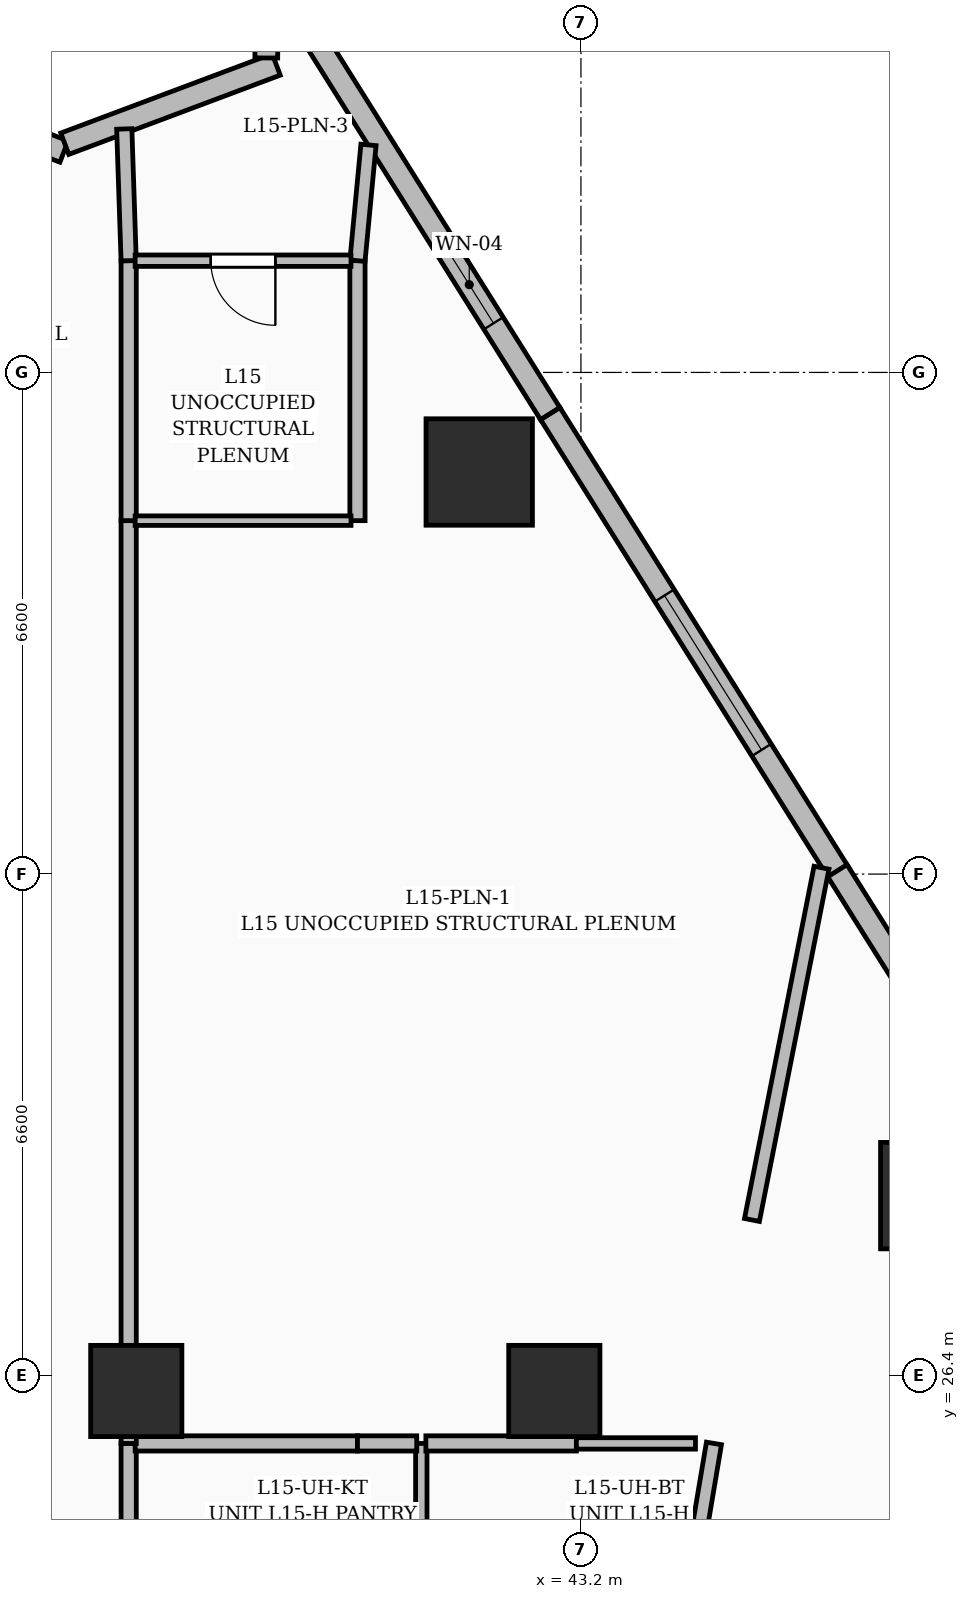
"""IFC4 building model, lengths in metres.
Left out: names, types, materials, properties, quantities, classifications, styles, units other than length and angle.
Written with IfcOpenShell. Run it as: python <this file> out.ifc"""

import sys

from ifc_helpers import new_model, si_unit, direction, frame, frame_2d, origin, origin_2d, place, context, subcontext, project, spatial, rectangle, extrude, element, fill, save


model = new_model("IFC4")
c1 = context("Model", 3, precision=1e-05, world=origin(), true_north=direction((0.0, 1.0)))
c2 = subcontext(c1, "Body", "Model", "MODEL_VIEW")
j1 = project(units=[si_unit("LENGTHUNIT", "METRE"), si_unit("PLANEANGLEUNIT", "RADIAN")], contexts=[c1])
p1 = place(None, origin())
s1 = spatial("IfcSite", under=j1, at=p1, CompositionType="ELEMENT")
p2 = place(p1, origin())
s2 = spatial("IfcBuilding", under=s1, at=p2, CompositionType="ELEMENT")
p3 = place(p2, frame((0.0, 0.0, 64.2)))
s3 = spatial("IfcBuildingStorey", under=s2, at=p3, CompositionType="ELEMENT", Elevation=64.2)
for number, where, z_axis, x_axis in (
    (1, (42.85, 26.2, 0.0), (0.0, 0.0, 1.0), (1.0, 0.0, 0.0)),
    (2, (37.35, 26.2, 0.0), (0.0, 0.0, 1.0), (1.0, 0.0, 0.0)),
):
    element("IfcColumn", number, at=place(p3, frame(where, z_axis=z_axis, x_axis=x_axis)), inside=s3, PredefinedType="COLUMN", context=c2, shape_type="SweptSolid", body=[
        extrude(rectangle(XDim=1.2, YDim=1.2, at=origin_2d()), origin(), (0.0, 0.0, 1.0), 3.6),
    ])
for number, where, z_axis, x_axis in (
    (3, (47.842, 28.77, 0.0), (0.0, 0.0, 1.0), (1.0, 0.0, 0.0)),
    (4, (41.862, 38.29, 0.0), (0.0, 0.0, 1.0), (1.0, 0.0, 0.0)),
):
    element("IfcColumn", number, at=place(p3, frame(where, z_axis=z_axis, x_axis=x_axis)), inside=s3, PredefinedType="COLUMN", context=c2, shape_type="SweptSolid", body=[
        extrude(rectangle(XDim=1.4, YDim=1.4, at=origin_2d()), origin(), (0.0, 0.0, 1.0), 3.6),
    ])
p4 = place(p3, frame((33.614, 43.579, 0.0), z_axis=(0.0, 0.0, 1.0), x_axis=(0.933166321884, -0.359444871576, 0.0)))
e5 = element("IfcWall", 5, at=p4, inside=s3, PredefinedType="SOLIDWALL", context=c2, shape_type="SweptSolid", body=[
    extrude(rectangle(XDim=2.985, YDim=0.3, at=frame_2d((1.493, 0.0))), origin(), (0.0, 0.0, 1.0), 3.35),
])
p5 = place(p4, frame((0.35, 0.0, 0.6)))
e6 = element("IfcOpeningElement", 6, at=p5, cuts=e5, PredefinedType="OPENING", context=c2, shape_type="SweptSolid", body=[
    extrude(rectangle(XDim=1.8, YDim=2.1, at=frame_2d((0.9, 1.05))), frame((0.0, 0.16, 0.0), z_axis=(0.0, -1.0, 0.0), x_axis=(1.0, 0.0, 0.0)), (0.0, 0.0, 1.0), 0.32),
])
p6 = place(p3, frame((36.409, 42.609, 0.0), z_axis=(0.0, 0.0, 1.0), x_axis=(0.936403459864, 0.350925291699, 0.0)))
e7 = element("IfcWall", 7, at=p6, inside=s3, PredefinedType="SOLIDWALL", context=c2, shape_type="SweptSolid", body=[
    extrude(rectangle(XDim=2.971, YDim=0.3, at=frame_2d((1.485, 0.0))), origin(), (0.0, 0.0, 1.0), 3.35),
])
p7 = place(p3, frame((39.061, 43.737, 0.0), z_axis=(0.0, 0.0, 1.0), x_axis=(0.004359916705, 0.999990495518, 0.0)))
e8 = element("IfcWall", 8, at=p7, inside=s3, PredefinedType="SOLIDWALL", context=c2, shape_type="SweptSolid", body=[
    extrude(rectangle(XDim=1.4, YDim=0.3, at=frame_2d((0.7, 0.0))), origin(), (0.0, 0.0, 1.0), 3.35),
])
p8 = place(p3, frame((39.284, 44.65, 0.0), z_axis=(0.0, 0.0, 1.0), x_axis=(0.531931524323, -0.846787372031, 0.0)))
e9 = element("IfcWall", 9, at=p8, inside=s3, PredefinedType="SOLIDWALL", context=c2, shape_type="SweptSolid", body=[
    extrude(rectangle(XDim=6.604, YDim=0.3, at=frame_2d((3.302, 0.0))), origin(), (0.0, 0.0, 1.0), 3.35),
])
p9 = place(p8, frame((4.0, 0.0, 0.8)))
e10 = element("IfcOpeningElement", 10, at=p9, cuts=e9, PredefinedType="OPENING", context=c2, shape_type="SweptSolid", body=[
    extrude(rectangle(XDim=1.2, YDim=1.8, at=frame_2d((0.6, 0.9))), frame((0.0, 0.16, 0.0), z_axis=(0.0, -1.0, 0.0), x_axis=(1.0, 0.0, 0.0)), (0.0, 0.0, 1.0), 0.32),
])
p10 = place(p3, frame((42.797, 39.058, 0.0), z_axis=(0.0, 0.0, 1.0), x_axis=(0.531893353762, -0.846811348663, 0.0)))
e11 = element("IfcWall", 11, at=p10, inside=s3, PredefinedType="SOLIDWALL", context=c2, shape_type="SweptSolid", body=[
    extrude(rectangle(XDim=7.154, YDim=0.3, at=frame_2d((3.577, 0.0))), origin(), (0.0, 0.0, 1.0), 3.35),
])
p11 = place(p10, frame((2.825, 0.0, 0.6)))
e12 = element("IfcOpeningElement", 12, at=p11, cuts=e11, PredefinedType="OPENING", context=c2, shape_type="SweptSolid", body=[
    extrude(rectangle(XDim=2.4, YDim=2.1, at=frame_2d((1.2, 1.05))), frame((0.0, 0.16, 0.0), z_axis=(0.0, -1.0, 0.0), x_axis=(1.0, 0.0, 0.0)), (0.0, 0.0, 1.0), 0.32),
])
p12 = place(p3, frame((46.574, 33.044, 0.0), z_axis=(0.0, 0.0, 1.0), x_axis=(0.531903730452, -0.846804830839, 0.0)))
e13 = element("IfcWall", 13, at=p12, inside=s3, PredefinedType="SOLIDWALL", context=c2, shape_type="SweptSolid", body=[
    extrude(rectangle(XDim=7.207, YDim=0.3, at=frame_2d((3.604, 0.0))), origin(), (0.0, 0.0, 1.0), 3.35),
])
p13 = place(p12, frame((1.903, 0.0, 0.55)))
e14 = element("IfcOpeningElement", 14, at=p13, cuts=e13, PredefinedType="OPENING", context=c2, shape_type="SweptSolid", body=[
    extrude(rectangle(XDim=2.1, YDim=2.4, at=frame_2d((1.05, 1.2))), frame((0.0, 0.16, 0.0), z_axis=(0.0, -1.0, 0.0), x_axis=(1.0, 0.0, 0.0)), (0.0, 0.0, 1.0), 0.32),
])
p14 = place(p3, frame((41.1, 22.768, 0.0), z_axis=(0.0, 0.0, 1.0), x_axis=(0.0, 1.0, 0.0)))
e15 = element("IfcWall", 15, at=p14, inside=s3, PredefinedType="PARTITIONING", context=c2, shape_type="SweptSolid", body=[
    extrude(rectangle(XDim=2.742, YDim=0.15, at=frame_2d((1.371, 0.0))), origin(), (0.0, 0.0, 1.0), 3.35),
])
p15 = place(p3, frame((37.25, 25.51, 0.0), z_axis=(0.0, 0.0, 1.0), x_axis=(0.0, -1.0, 0.0)))
e16 = element("IfcWall", 16, at=p15, inside=s3, PredefinedType="PARTITIONING", context=c2, shape_type="SweptSolid", body=[
    extrude(rectangle(XDim=2.742, YDim=0.2, at=frame_2d((1.371, 0.0))), origin(), (0.0, 0.0, 1.0), 2.309),
])
p16 = place(p3, frame((40.26, 25.51, 0.0), z_axis=(0.0, 0.0, 1.0), x_axis=(-1.0, 0.0, 0.0)))
e17 = element("IfcWall", 17, at=p16, inside=s3, PredefinedType="PARTITIONING", context=c2, shape_type="SweptSolid", body=[
    extrude(rectangle(XDim=2.925, YDim=0.2, at=frame_2d((1.462, 0.0))), origin(), (0.0, 0.0, 1.0), 3.35),
])
p17 = place(p3, frame((44.49, 22.779, 0.0), z_axis=(0.0, 0.0, 1.0), x_axis=(0.166100060311, 0.986108903704, 0.0)))
e18 = element("IfcWall", 18, at=p17, inside=s3, PredefinedType="PARTITIONING", context=c2, shape_type="SweptSolid", body=[
    extrude(rectangle(XDim=2.769, YDim=0.2, at=frame_2d((1.385, 0.0))), origin(), (0.0, 0.0, 1.0), 3.35),
])
p18 = place(p3, frame((43.14, 25.51, 0.0), z_axis=(0.0, 0.0, 1.0), x_axis=(-1.0, 0.0, 0.0)))
e19 = element("IfcWall", 19, at=p18, inside=s3, PredefinedType="PARTITIONING", context=c2, shape_type="SweptSolid", body=[
    extrude(rectangle(XDim=1.98, YDim=0.2, at=frame_2d((0.99, 0.0))), origin(), (0.0, 0.0, 1.0), 2.309),
])
p19 = place(p3, frame((46.365, 33.084, 0.0), z_axis=(0.0, 0.0, 1.0), x_axis=(-0.193720090738, -0.981056841597, 0.0)))
e20 = element("IfcWall", 20, at=p19, inside=s3, PredefinedType="PARTITIONING", context=c2, shape_type="SweptSolid", body=[
    extrude(rectangle(XDim=4.724, YDim=0.2, at=frame_2d((2.362, 0.0))), origin(), (0.0, 0.0, 1.0), 2.37),
])
p20 = place(p3, frame((37.25, 25.51, 0.0), z_axis=(0.0, 0.0, 1.0), x_axis=(0.0, 1.0, 0.0)))
e21 = element("IfcWall", 21, at=p20, inside=s3, PredefinedType="PARTITIONING", context=c2, shape_type="SweptSolid", body=[
    extrude(rectangle(XDim=12.14, YDim=0.2, at=frame_2d((6.07, 0.0))), origin(), (0.0, 0.0, 1.0), 2.279),
])
p21 = place(p3, frame((37.25, 37.65, 0.0), z_axis=(0.0, 0.0, 1.0), x_axis=(0.0, 1.0, 0.0)))
e22 = element("IfcWall", 22, at=p21, inside=s3, PredefinedType="PARTITIONING", context=c2, shape_type="SweptSolid", body=[
    extrude(rectangle(XDim=3.42, YDim=0.2, at=frame_2d((1.71, 0.0))), origin(), (0.0, 0.0, 1.0), 2.37),
])
p22 = place(p3, frame((37.25, 41.07, 0.0), z_axis=(0.0, 0.0, 1.0), x_axis=(-0.033511738673, 0.999438323946, 0.0)))
e23 = element("IfcWall", 23, at=p22, inside=s3, PredefinedType="PARTITIONING", context=c2, shape_type="SweptSolid", body=[
    extrude(rectangle(XDim=1.734, YDim=0.2, at=frame_2d((0.867, 0.0))), origin(), (0.0, 0.0, 1.0), 3.35),
])
p23 = place(p3, frame((40.26, 41.07, 0.0), z_axis=(0.0, 0.0, 1.0), x_axis=(0.0, -1.0, 0.0)))
e24 = element("IfcWall", 24, at=p23, inside=s3, PredefinedType="PARTITIONING", context=c2, shape_type="SweptSolid", body=[
    extrude(rectangle(XDim=3.42, YDim=0.2, at=frame_2d((1.71, 0.0))), origin(), (0.0, 0.0, 1.0), 2.37),
])
p24 = place(p3, frame((40.405, 42.593, 0.0), z_axis=(0.0, 0.0, 1.0), x_axis=(-0.094794030576, -0.99549690696, 0.0)))
e25 = element("IfcWall", 25, at=p24, inside=s3, PredefinedType="PARTITIONING", context=c2, shape_type="SweptSolid", body=[
    extrude(rectangle(XDim=1.53, YDim=0.2, at=frame_2d((0.765, 0.0))), origin(), (0.0, 0.0, 1.0), 3.35),
])
p25 = place(p3, frame((40.175, 37.65, 0.0), z_axis=(0.0, 0.0, 1.0), x_axis=(-1.0, 0.0, 0.0)))
e26 = element("IfcWall", 26, at=p25, inside=s3, PredefinedType="PARTITIONING", context=c2, shape_type="SweptSolid", body=[
    extrude(rectangle(XDim=2.84, YDim=0.125, at=frame_2d((1.42, 0.0))), origin(), (0.0, 0.0, 1.0), 3.35),
])
p26 = place(p3, frame((40.175, 41.07, 0.0), z_axis=(0.0, 0.0, 1.0), x_axis=(-1.0, 0.0, 0.0)))
e27 = element("IfcWall", 27, at=p26, inside=s3, PredefinedType="PARTITIONING", context=c2, shape_type="SweptSolid", body=[
    extrude(rectangle(XDim=2.84, YDim=0.15, at=frame_2d((1.42, 0.0))), origin(), (0.0, 0.0, 1.0), 3.35),
])
p27 = place(p26, frame((0.995, 0.0, 0.0)))
e28 = element("IfcOpeningElement", 28, at=p27, cuts=e27, PredefinedType="OPENING", context=c2, shape_type="SweptSolid", body=[
    extrude(rectangle(XDim=0.85, YDim=2.1, at=frame_2d((0.425, 1.05))), frame((0.0, 0.085, 0.0), z_axis=(0.0, -1.0, 0.0), x_axis=(1.0, 0.0, 0.0)), (0.0, 0.0, 1.0), 0.17),
])
p28 = place(p3, frame((41.04, 25.51, 0.0), z_axis=(0.0, 0.0, 1.0), x_axis=(-1.0, 0.0, 0.0)))
e29 = element("IfcWall", 29, at=p28, inside=s3, PredefinedType="PARTITIONING", context=c2, shape_type="SweptSolid", body=[
    extrude(rectangle(XDim=0.78, YDim=0.2, at=frame_2d((0.39, 0.0))), origin(), (0.0, 0.0, 1.0), 3.35),
])
p29 = place(p3, frame((44.707, 25.51, 0.0), z_axis=(0.0, 0.0, 1.0), x_axis=(-1.0, 0.0, 0.0)))
e30 = element("IfcWall", 30, at=p29, inside=s3, PredefinedType="PARTITIONING", context=c2, shape_type="SweptSolid", body=[
    extrude(rectangle(XDim=1.567, YDim=0.15, at=frame_2d((0.784, 0.0))), origin(), (0.0, 0.0, 1.0), 2.309),
])
p30 = place(p9, origin())
e31 = element("IfcWindow", 31, at=p30, inside=s3, PartitioningType="SINGLE_PANEL", PredefinedType="WINDOW", context=c2, shape_type="SweptSolid", body=[
    extrude(rectangle(XDim=1.2, YDim=1.8, at=frame_2d((0.6, 0.9))), frame((0.0, 0.03, 0.0), z_axis=(0.0, -1.0, 0.0), x_axis=(1.0, 0.0, 0.0)), (0.0, 0.0, 1.0), 0.06),
])
fill(e10, e31)
p31 = place(p11, origin())
e32 = element("IfcWindow", 32, at=p31, inside=s3, PartitioningType="SINGLE_PANEL", PredefinedType="WINDOW", context=c2, shape_type="SweptSolid", body=[
    extrude(rectangle(XDim=2.4, YDim=2.1, at=frame_2d((1.2, 1.05))), frame((0.0, 0.03, 0.0), z_axis=(0.0, -1.0, 0.0), x_axis=(1.0, 0.0, 0.0)), (0.0, 0.0, 1.0), 0.06),
])
fill(e12, e32)
p32 = place(p27, origin())
e33 = element("IfcDoor", 33, at=p32, inside=s3, OperationType="SINGLE_SWING_LEFT", PredefinedType="DOOR", context=c2, shape_type="SweptSolid", body=[
    extrude(rectangle(XDim=0.85, YDim=2.1, at=frame_2d((0.425, 1.05))), frame((0.0, 0.025, 0.0), z_axis=(0.0, -1.0, 0.0), x_axis=(1.0, 0.0, 0.0)), (0.0, 0.0, 1.0), 0.05),
])
fill(e28, e33)
save(model, sys.argv[1])
